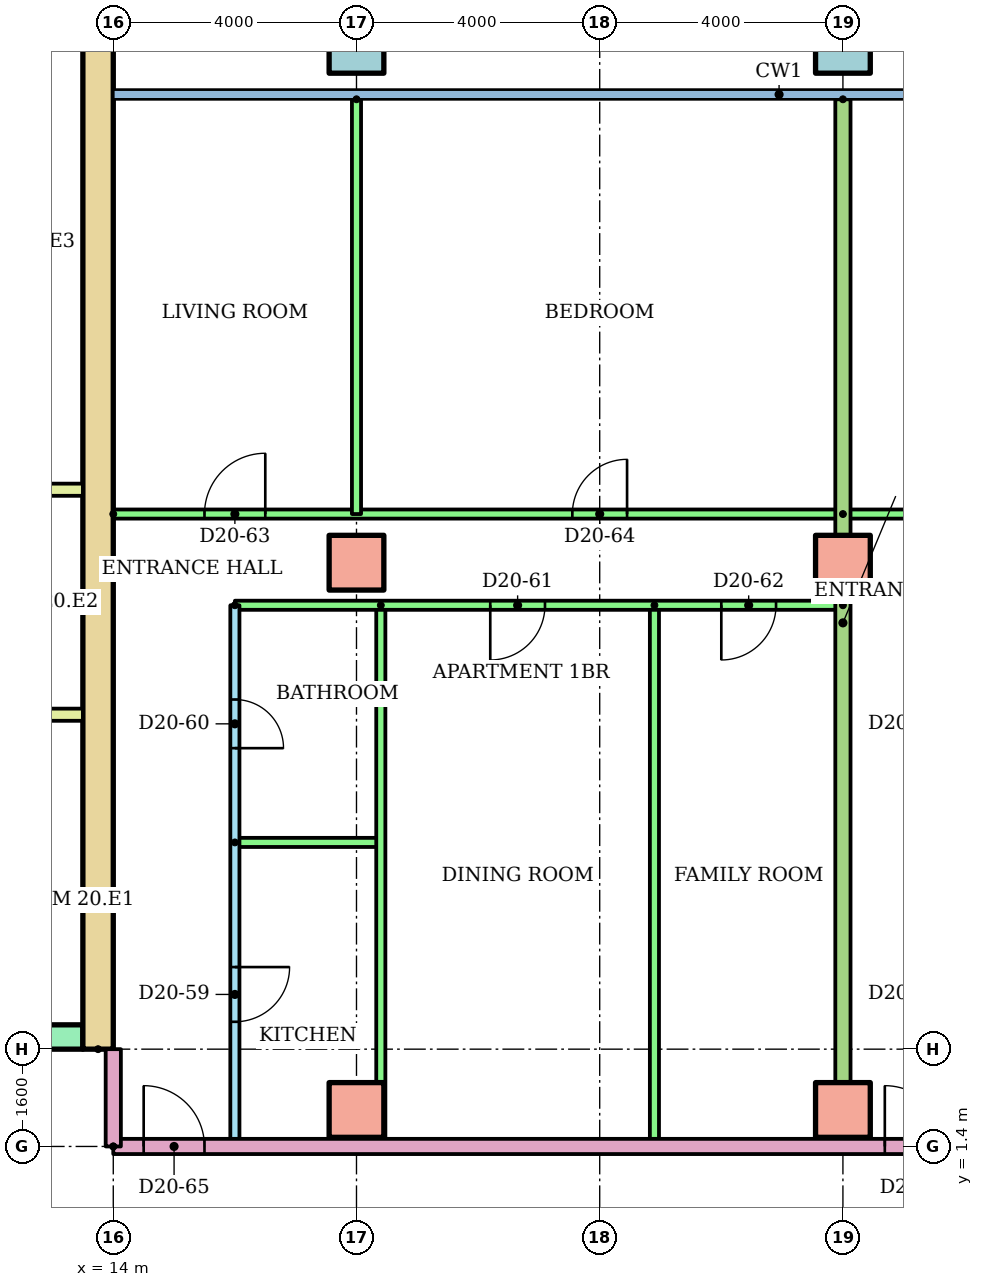
"""IFC4 building model, lengths in metres.
Left out: names, types, materials, properties, quantities, classifications, styles, units other than length and angle.
Written with IfcOpenShell. Run it as: python <this file> out.ifc"""

import sys

from ifc_helpers import new_model, si_unit, direction, frame, frame_2d, origin, origin_2d, place, context, subcontext, project, spatial, rectangle, hollow_rectangle, extrude, element, fill, save


model = new_model("IFC4")
c1 = context("Model", 3, precision=1e-05, world=origin(), true_north=direction((0.0, 1.0)))
c2 = subcontext(c1, "Body", "Model", "MODEL_VIEW")
j1 = project(units=[si_unit("LENGTHUNIT", "METRE"), si_unit("PLANEANGLEUNIT", "RADIAN")], contexts=[c1])
p1 = place(None, origin())
s1 = spatial("IfcSite", under=j1, at=p1, CompositionType="ELEMENT")
p2 = place(p1, origin())
s2 = spatial("IfcBuilding", under=s1, at=p2, CompositionType="ELEMENT")
p3 = place(p2, frame((0.0, 0.0, 80.7)))
s3 = spatial("IfcBuildingStorey", under=s2, at=p3, CompositionType="ELEMENT", Elevation=80.7)
for number, where in (
    (1, (18.0, 2.0, 0.0)),
    (2, (26.0, 2.0, 0.0)),
    (3, (18.0, 11.0, 0.0)),
    (4, (26.0, 11.0, 0.0)),
):
    element("IfcColumn", number, at=place(p3, frame(where)), inside=s3, PredefinedType="COLUMN", context=c2, shape_type="SweptSolid", body=[
        extrude(rectangle(XDim=0.9, YDim=0.9, at=origin_2d()), origin(), (0.0, 0.0, 1.0), 3.2),
    ])
for number, where in (
    (5, (18.0, 19.5, 0.0)),
    (6, (26.0, 19.5, 0.0)),
):
    element("IfcColumn", number, at=place(p3, frame(where)), inside=s3, PredefinedType="COLUMN", context=c2, shape_type="SweptSolid", body=[
        extrude(hollow_rectangle(XDim=0.9, YDim=0.9, WallThickness=0.045, at=origin_2d()), origin(), (0.0, 0.0, 1.0), 3.2),
    ])
p4 = place(p3, frame((13.75, 3.0, 0.0), z_axis=(0.0, 0.0, 1.0), x_axis=(0.0, 1.0, 0.0)))
e7 = element("IfcWall", 7, at=p4, inside=s3, PredefinedType="SHEAR", context=c2, shape_type="SweptSolid", body=[
    extrude(rectangle(XDim=17.0, YDim=0.5, at=frame_2d((8.5, 0.0))), origin(), (0.0, 0.0, 1.0), 2.92),
])
p5 = place(p3, frame((-13.5, 3.2, 0.0)))
e8 = element("IfcWall", 8, at=p5, inside=s3, PredefinedType="SHEAR", context=c2, shape_type="SweptSolid", body=[
    extrude(rectangle(XDim=27.0, YDim=0.4, at=frame_2d((13.5, 0.0))), origin(), (0.0, 0.0, 1.0), 2.92),
])
p6 = place(p5, frame((6.861, 0.0, 0.0)))
e9 = element("IfcOpeningElement", 9, at=p6, cuts=e8, PredefinedType="OPENING", context=c2, shape_type="SweptSolid", body=[
    extrude(rectangle(XDim=1.1, YDim=2.1, at=frame_2d((0.55, 1.05))), frame((0.0, 0.21, 0.0), z_axis=(0.0, -1.0, 0.0), x_axis=(1.0, 0.0, 0.0)), (0.0, 0.0, 1.0), 0.42),
])
p7 = place(p5, frame((9.906, 0.0, 0.0)))
e10 = element("IfcOpeningElement", 10, at=p7, cuts=e8, PredefinedType="OPENING", context=c2, shape_type="SweptSolid", body=[
    extrude(rectangle(XDim=1.1, YDim=2.1, at=frame_2d((0.55, 1.05))), frame((0.0, 0.21, 0.0), z_axis=(0.0, -1.0, 0.0), x_axis=(1.0, 0.0, 0.0)), (0.0, 0.0, 1.0), 0.42),
])
p8 = place(p5, frame((15.994, 0.0, 0.0)))
e11 = element("IfcOpeningElement", 11, at=p8, cuts=e8, PredefinedType="OPENING", context=c2, shape_type="SweptSolid", body=[
    extrude(rectangle(XDim=1.1, YDim=2.1, at=frame_2d((0.55, 1.05))), frame((0.0, 0.21, 0.0), z_axis=(0.0, -1.0, 0.0), x_axis=(1.0, 0.0, 0.0)), (0.0, 0.0, 1.0), 0.42),
])
p9 = place(p5, frame((19.039, 0.0, 0.0)))
e12 = element("IfcOpeningElement", 12, at=p9, cuts=e8, PredefinedType="OPENING", context=c2, shape_type="SweptSolid", body=[
    extrude(rectangle(XDim=1.1, YDim=2.1, at=frame_2d((0.55, 1.05))), frame((0.0, 0.21, 0.0), z_axis=(0.0, -1.0, 0.0), x_axis=(1.0, 0.0, 0.0)), (0.0, 0.0, 1.0), 0.42),
])
p10 = place(p5, frame((12.6, 0.0, 0.0)))
e13 = element("IfcOpeningElement", 13, at=p10, cuts=e8, PredefinedType="OPENING", context=c2, shape_type="SweptSolid", body=[
    extrude(rectangle(XDim=1.8, YDim=2.1, at=frame_2d((0.9, 1.05))), frame((0.0, 0.21, 0.0), z_axis=(0.0, -1.0, 0.0), x_axis=(1.0, 0.0, 0.0)), (0.0, 0.0, 1.0), 0.42),
])
for number, where in (
    (14, (9.6, 8.5, 0.0)),
    (15, (9.6, 12.2, 0.0)),
):
    element("IfcWall", number, at=place(p3, frame(where)), inside=s3, PredefinedType="PARTITIONING", context=c2, shape_type="SweptSolid", body=[
        extrude(rectangle(XDim=3.9, YDim=0.2, at=frame_2d((1.95, 0.0))), origin(), (0.0, 0.0, 1.0), 2.92),
    ])
p11 = place(p3, frame((16.0, 10.3, 0.0), z_axis=(0.0, 0.0, 1.0), x_axis=(0.0, -1.0, 0.0)))
e16 = element("IfcWall", 16, at=p11, inside=s3, PredefinedType="PARTITIONING", context=c2, shape_type="SweptSolid", body=[
    extrude(rectangle(XDim=8.9, YDim=0.15, at=frame_2d((4.45, 0.0))), origin(), (0.0, 0.0, 1.0), 2.4),
])
p12 = place(p11, frame((5.95, 0.0, 0.0)))
e17 = element("IfcOpeningElement", 17, at=p12, cuts=e16, PredefinedType="OPENING", context=c2, shape_type="SweptSolid", body=[
    extrude(rectangle(XDim=0.9, YDim=2.1, at=frame_2d((0.45, 1.05))), frame((0.0, 0.085, 0.0), z_axis=(0.0, -1.0, 0.0), x_axis=(1.0, 0.0, 0.0)), (0.0, 0.0, 1.0), 0.17),
])
p13 = place(p11, frame((1.55, 0.0, 0.0)))
e18 = element("IfcOpeningElement", 18, at=p13, cuts=e16, PredefinedType="OPENING", context=c2, shape_type="SweptSolid", body=[
    extrude(rectangle(XDim=0.8, YDim=2.1, at=frame_2d((0.4, 1.05))), frame((0.0, 0.085, 0.0), z_axis=(0.0, -1.0, 0.0), x_axis=(1.0, 0.0, 0.0)), (0.0, 0.0, 1.0), 0.17),
])
p14 = place(p3, frame((16.0, 6.4, 0.0)))
e19 = element("IfcWall", 19, at=p14, inside=s3, PredefinedType="PARTITIONING", context=c2, shape_type="SweptSolid", body=[
    extrude(rectangle(XDim=2.4, YDim=0.15, at=frame_2d((1.2, 0.0))), origin(), (0.0, 0.0, 1.0), 2.4),
])
for number, where, z_axis, x_axis in (
    (20, (18.4, 10.3, 0.0), (0.0, 0.0, 1.0), (0.0, -1.0, 0.0)),
    (21, (22.9, 10.3, 0.0), (0.0, 0.0, 1.0), (0.0, -1.0, 0.0)),
):
    element("IfcWall", number, at=place(p3, frame(where, z_axis=z_axis, x_axis=x_axis)), inside=s3, PredefinedType="PARTITIONING", context=c2, shape_type="SweptSolid", body=[
        extrude(rectangle(XDim=8.9, YDim=0.15, at=frame_2d((4.45, 0.0))), origin(), (0.0, 0.0, 1.0), 2.4),
    ])
p15 = place(p3, frame((26.0, 10.3, 0.0), z_axis=(0.0, 0.0, 1.0), x_axis=(-1.0, 0.0, 0.0)))
e22 = element("IfcWall", 22, at=p15, inside=s3, PredefinedType="PARTITIONING", context=c2, shape_type="SweptSolid", body=[
    extrude(rectangle(XDim=10.0, YDim=0.15, at=frame_2d((5.0, 0.0))), origin(), (0.0, 0.0, 1.0), 2.4),
])
p16 = place(p15, frame((4.9, 0.0, 0.0)))
e23 = element("IfcOpeningElement", 23, at=p16, cuts=e22, PredefinedType="OPENING", context=c2, shape_type="SweptSolid", body=[
    extrude(rectangle(XDim=0.9, YDim=2.1, at=frame_2d((0.45, 1.05))), frame((0.0, 0.085, 0.0), z_axis=(0.0, -1.0, 0.0), x_axis=(1.0, 0.0, 0.0)), (0.0, 0.0, 1.0), 0.17),
])
p17 = place(p15, frame((1.1, 0.0, 0.0)))
e24 = element("IfcOpeningElement", 24, at=p17, cuts=e22, PredefinedType="OPENING", context=c2, shape_type="SweptSolid", body=[
    extrude(rectangle(XDim=0.9, YDim=2.1, at=frame_2d((0.45, 1.05))), frame((0.0, 0.085, 0.0), z_axis=(0.0, -1.0, 0.0), x_axis=(1.0, 0.0, 0.0)), (0.0, 0.0, 1.0), 0.17),
])
p18 = place(p3, frame((14.0, 11.8, 0.0)))
e25 = element("IfcWall", 25, at=p18, inside=s3, PredefinedType="PARTITIONING", context=c2, shape_type="SweptSolid", body=[
    extrude(rectangle(XDim=12.0, YDim=0.15, at=frame_2d((6.0, 0.0))), origin(), (0.0, 0.0, 1.0), 2.4),
])
p19 = place(p18, frame((1.5, 0.0, 0.0)))
e26 = element("IfcOpeningElement", 26, at=p19, cuts=e25, PredefinedType="OPENING", context=c2, shape_type="SweptSolid", body=[
    extrude(rectangle(XDim=1.0, YDim=2.1, at=frame_2d((0.5, 1.05))), frame((0.0, 0.085, 0.0), z_axis=(0.0, -1.0, 0.0), x_axis=(1.0, 0.0, 0.0)), (0.0, 0.0, 1.0), 0.17),
])
p20 = place(p18, frame((7.55, 0.0, 0.0)))
e27 = element("IfcOpeningElement", 27, at=p20, cuts=e25, PredefinedType="OPENING", context=c2, shape_type="SweptSolid", body=[
    extrude(rectangle(XDim=0.9, YDim=2.1, at=frame_2d((0.45, 1.05))), frame((0.0, 0.085, 0.0), z_axis=(0.0, -1.0, 0.0), x_axis=(1.0, 0.0, 0.0)), (0.0, 0.0, 1.0), 0.17),
])
p21 = place(p3, frame((18.0, 18.621, 0.0), z_axis=(0.0, 0.0, 1.0), x_axis=(0.0, -1.0, 0.0)))
e28 = element("IfcWall", 28, at=p21, inside=s3, PredefinedType="PARTITIONING", context=c2, shape_type="SweptSolid", body=[
    extrude(rectangle(XDim=6.821, YDim=0.15, at=frame_2d((3.411, 0.0))), origin(), (0.0, 0.0, 1.0), 2.4),
])
p22 = place(p3, frame((26.0, 11.8, 0.0)))
e29 = element("IfcWall", 29, at=p22, inside=s3, PredefinedType="PARTITIONING", context=c2, shape_type="SweptSolid", body=[
    extrude(rectangle(XDim=14.62, YDim=0.15, at=frame_2d((7.31, 0.0))), origin(), (0.0, 0.0, 1.0), 2.4),
])
p23 = place(p22, frame((3.5, 0.0, 0.0)))
e30 = element("IfcOpeningElement", 30, at=p23, cuts=e29, PredefinedType="OPENING", context=c2, shape_type="SweptSolid", body=[
    extrude(rectangle(XDim=1.0, YDim=2.1, at=frame_2d((0.5, 1.05))), frame((0.0, 0.085, 0.0), z_axis=(0.0, -1.0, 0.0), x_axis=(1.0, 0.0, 0.0)), (0.0, 0.0, 1.0), 0.17),
])
p24 = place(p22, frame((10.7, 0.0, 0.0)))
e31 = element("IfcOpeningElement", 31, at=p24, cuts=e29, PredefinedType="OPENING", context=c2, shape_type="SweptSolid", body=[
    extrude(rectangle(XDim=1.0, YDim=2.1, at=frame_2d((0.5, 1.05))), frame((0.0, 0.085, 0.0), z_axis=(0.0, -1.0, 0.0), x_axis=(1.0, 0.0, 0.0)), (0.0, 0.0, 1.0), 0.17),
])
p25 = place(p3, frame((26.0, 18.621, 0.0), z_axis=(0.0, 0.0, 1.0), x_axis=(0.0, -1.0, 0.0)))
e32 = element("IfcWall", 32, at=p25, inside=s3, PredefinedType="PARTITIONING", context=c2, shape_type="SweptSolid", body=[
    extrude(rectangle(XDim=17.221, YDim=0.25, at=frame_2d((8.611, 0.0))), origin(), (0.0, 0.0, 1.0), 2.4),
])
p26 = place(p3, frame((14.0, 1.4, 0.0)))
e33 = element("IfcWall", 33, at=p26, inside=s3, PredefinedType="PARTITIONING", context=c2, shape_type="SweptSolid", body=[
    extrude(rectangle(XDim=15.0, YDim=0.25, at=frame_2d((7.5, 0.0))), origin(), (0.0, 0.0, 1.0), 2.4),
])
p27 = place(p26, frame((0.5, 0.0, 0.0)))
e34 = element("IfcOpeningElement", 34, at=p27, cuts=e33, PredefinedType="OPENING", context=c2, shape_type="SweptSolid", body=[
    extrude(rectangle(XDim=1.0, YDim=2.1, at=frame_2d((0.5, 1.05))), frame((0.0, 0.135, 0.0), z_axis=(0.0, -1.0, 0.0), x_axis=(1.0, 0.0, 0.0)), (0.0, 0.0, 1.0), 0.27),
])
p28 = place(p26, frame((12.689, 0.0, 0.0)))
e35 = element("IfcOpeningElement", 35, at=p28, cuts=e33, PredefinedType="OPENING", context=c2, shape_type="SweptSolid", body=[
    extrude(rectangle(XDim=1.0, YDim=2.1, at=frame_2d((0.5, 1.05))), frame((0.0, 0.135, 0.0), z_axis=(0.0, -1.0, 0.0), x_axis=(1.0, 0.0, 0.0)), (0.0, 0.0, 1.0), 0.27),
])
p29 = place(p3, frame((14.0, 1.4, 0.0), z_axis=(0.0, 0.0, 1.0), x_axis=(0.0, 1.0, 0.0)))
e36 = element("IfcWall", 36, at=p29, inside=s3, PredefinedType="PARTITIONING", context=c2, shape_type="SweptSolid", body=[
    extrude(rectangle(XDim=1.6, YDim=0.25, at=frame_2d((0.8, 0.0))), origin(), (0.0, 0.0, 1.0), 2.4),
])
p30 = place(p12, origin())
e37 = element("IfcDoor", 37, at=p30, inside=s3, OperationType="SINGLE_SWING_LEFT", PredefinedType="DOOR", context=c2, shape_type="SweptSolid", body=[
    extrude(rectangle(XDim=0.9, YDim=2.1, at=frame_2d((0.45, 1.05))), frame((0.0, 0.025, 0.0), z_axis=(0.0, -1.0, 0.0), x_axis=(1.0, 0.0, 0.0)), (0.0, 0.0, 1.0), 0.05),
])
fill(e17, e37)
p31 = place(p13, origin())
e38 = element("IfcDoor", 38, at=p31, inside=s3, OperationType="SINGLE_SWING_RIGHT", PredefinedType="DOOR", context=c2, shape_type="SweptSolid", body=[
    extrude(rectangle(XDim=0.8, YDim=2.1, at=frame_2d((0.4, 1.05))), frame((0.0, 0.025, 0.0), z_axis=(0.0, -1.0, 0.0), x_axis=(1.0, 0.0, 0.0)), (0.0, 0.0, 1.0), 0.05),
])
fill(e18, e38)
p32 = place(p16, origin())
e39 = element("IfcDoor", 39, at=p32, inside=s3, OperationType="SINGLE_SWING_RIGHT", PredefinedType="DOOR", context=c2, shape_type="SweptSolid", body=[
    extrude(rectangle(XDim=0.9, YDim=2.1, at=frame_2d((0.45, 1.05))), frame((0.0, 0.025, 0.0), z_axis=(0.0, -1.0, 0.0), x_axis=(1.0, 0.0, 0.0)), (0.0, 0.0, 1.0), 0.05),
])
fill(e23, e39)
p33 = place(p17, origin())
e40 = element("IfcDoor", 40, at=p33, inside=s3, OperationType="SINGLE_SWING_RIGHT", PredefinedType="DOOR", context=c2, shape_type="SweptSolid", body=[
    extrude(rectangle(XDim=0.9, YDim=2.1, at=frame_2d((0.45, 1.05))), frame((0.0, 0.025, 0.0), z_axis=(0.0, -1.0, 0.0), x_axis=(1.0, 0.0, 0.0)), (0.0, 0.0, 1.0), 0.05),
])
fill(e24, e40)
p34 = place(p19, origin())
e41 = element("IfcDoor", 41, at=p34, inside=s3, OperationType="SINGLE_SWING_RIGHT", PredefinedType="DOOR", context=c2, shape_type="SweptSolid", body=[
    extrude(rectangle(XDim=1.0, YDim=2.1, at=frame_2d((0.5, 1.05))), frame((0.0, 0.025, 0.0), z_axis=(0.0, -1.0, 0.0), x_axis=(1.0, 0.0, 0.0)), (0.0, 0.0, 1.0), 0.05),
])
fill(e26, e41)
p35 = place(p20, origin())
e42 = element("IfcDoor", 42, at=p35, inside=s3, OperationType="SINGLE_SWING_RIGHT", PredefinedType="DOOR", context=c2, shape_type="SweptSolid", body=[
    extrude(rectangle(XDim=0.9, YDim=2.1, at=frame_2d((0.45, 1.05))), frame((0.0, 0.025, 0.0), z_axis=(0.0, -1.0, 0.0), x_axis=(1.0, 0.0, 0.0)), (0.0, 0.0, 1.0), 0.05),
])
fill(e27, e42)
p36 = place(p27, origin())
e43 = element("IfcDoor", 43, at=p36, inside=s3, OperationType="SINGLE_SWING_LEFT", PredefinedType="DOOR", context=c2, shape_type="SweptSolid", body=[
    extrude(rectangle(XDim=1.0, YDim=2.1, at=frame_2d((0.5, 1.05))), frame((0.0, 0.025, 0.0), z_axis=(0.0, -1.0, 0.0), x_axis=(1.0, 0.0, 0.0)), (0.0, 0.0, 1.0), 0.05),
])
fill(e34, e43)
p37 = place(p28, origin())
e44 = element("IfcDoor", 44, at=p37, inside=s3, OperationType="SINGLE_SWING_LEFT", PredefinedType="DOOR", context=c2, shape_type="SweptSolid", body=[
    extrude(rectangle(XDim=1.0, YDim=2.1, at=frame_2d((0.5, 1.05))), frame((0.0, 0.025, 0.0), z_axis=(0.0, -1.0, 0.0), x_axis=(1.0, 0.0, 0.0)), (0.0, 0.0, 1.0), 0.05),
])
fill(e35, e44)
save(model, sys.argv[1])
